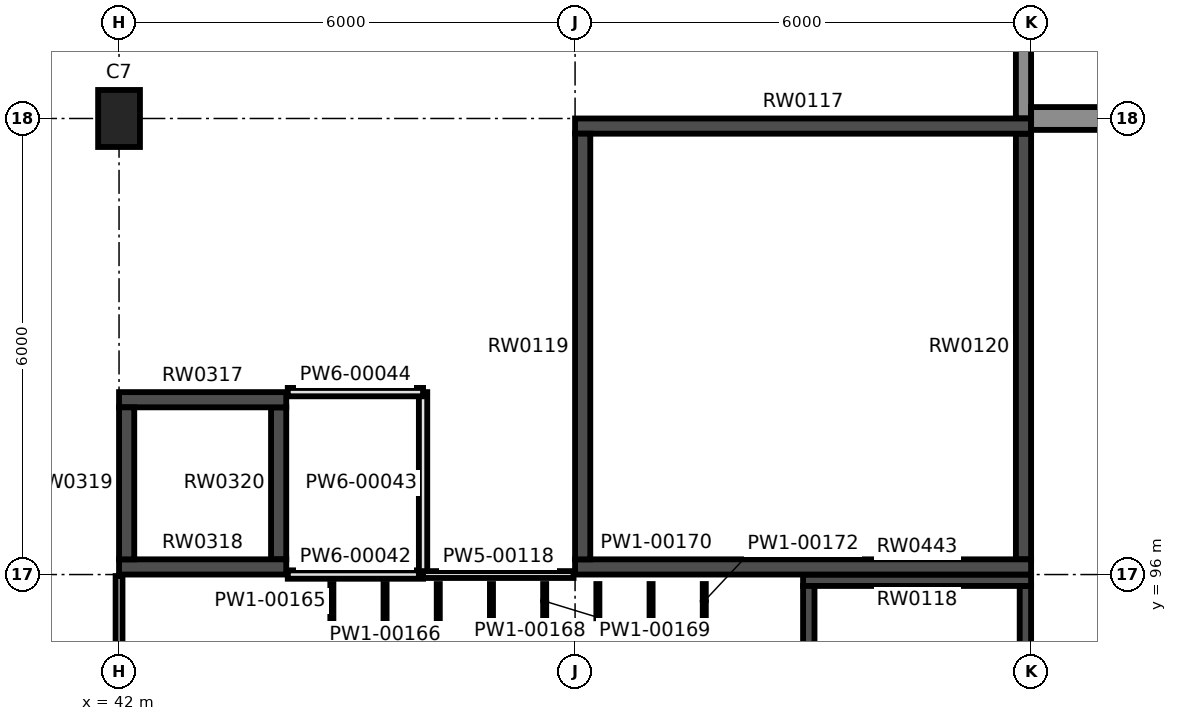
"""IFC4 building model, lengths in metres.
Left out: names, types, materials, properties, quantities, classifications, styles, units other than length and angle.
Written with IfcOpenShell. Run it as: python <this file> out.ifc"""

import sys

from ifc_helpers import new_model, si_unit, direction, frame, frame_2d, origin, origin_2d, place, context, subcontext, project, spatial, polyline, rectangle, outline, extrude, element, fill, save


model = new_model("IFC4")
c1 = context("Model", 3, precision=1e-05, world=origin(), true_north=direction((0.0, 1.0)))
c2 = subcontext(c1, "Body", "Model", "MODEL_VIEW")
j1 = project(units=[si_unit("LENGTHUNIT", "METRE"), si_unit("PLANEANGLEUNIT", "RADIAN")], contexts=[c1])
p1 = place(None, origin())
s1 = spatial("IfcSite", under=j1, at=p1, CompositionType="ELEMENT")
p2 = place(p1, origin())
s2 = spatial("IfcBuilding", under=s1, at=p2, CompositionType="ELEMENT")
p3 = place(p2, origin())
s3 = spatial("IfcBuildingStorey", under=s2, at=p3, CompositionType="ELEMENT", Elevation=0.0)
p4 = place(p3, frame((42.0, 102.0, -0.3), z_axis=(0.0, 0.0, 1.0), x_axis=(1.0, 0.0, 0.0)))
e1 = element("IfcColumn", 1, at=p4, inside=s3, PredefinedType="COLUMN", context=c2, shape_type="SweptSolid", body=[
    extrude(rectangle(XDim=0.55, YDim=0.75, at=origin_2d()), origin(), (0.0, 0.0, 1.0), 7.3),
])
p5 = place(p3, frame((48.0, 101.9, -0.3), z_axis=(0.0, 0.0, 1.0), x_axis=(1.0, 0.0, 0.0)))
e2 = element("IfcWall", 2, at=p5, inside=s3, PredefinedType="SHEAR", context=c2, shape_type="SweptSolid", body=[
    extrude(rectangle(XDim=6.0, YDim=0.2, at=frame_2d((3.0, 0.0))), origin(), (0.0, 0.0, 1.0), 7.3),
])
p6 = place(p5, frame((2.1, 0.0, 0.3)))
e3 = element("IfcOpeningElement", 3, at=p6, cuts=e2, PredefinedType="OPENING", context=c2, shape_type="SweptSolid", body=[
    extrude(rectangle(XDim=1.8, YDim=2.2, at=frame_2d((0.9, 1.1))), frame((0.0, 0.11, 0.0), z_axis=(0.0, -1.0, 0.0), x_axis=(1.0, 0.0, 0.0)), (0.0, 0.0, 1.0), 0.22),
])
p7 = place(p3, frame((48.0, 96.1, -0.3), z_axis=(0.0, 0.0, 1.0), x_axis=(1.0, 0.0, 0.0)))
e4 = element("IfcWall", 4, at=p7, inside=s3, PredefinedType="SHEAR", context=c2, shape_type="SweptSolid", body=[
    extrude(rectangle(XDim=6.0, YDim=0.2, at=frame_2d((3.0, 0.0))), origin(), (0.0, 0.0, 1.0), 7.3),
])
p8 = place(p3, frame((48.1, 96.2, -0.3), z_axis=(0.0, 0.0, 1.0), x_axis=(0.0, 1.0, 0.0)))
e5 = element("IfcWall", 5, at=p8, inside=s3, PredefinedType="SHEAR", context=c2, shape_type="SweptSolid", body=[
    extrude(rectangle(XDim=5.6, YDim=0.2, at=frame_2d((2.8, 0.0))), origin(), (0.0, 0.0, 1.0), 7.3),
])
p9 = place(p8, frame((4.4, 0.0, 0.3)))
e6 = element("IfcOpeningElement", 6, at=p9, cuts=e5, PredefinedType="OPENING", context=c2, shape_type="SweptSolid", body=[
    extrude(rectangle(XDim=1.1, YDim=2.2, at=frame_2d((0.55, 1.1))), frame((0.0, 0.11, 0.0), z_axis=(0.0, -1.0, 0.0), x_axis=(1.0, 0.0, 0.0)), (0.0, 0.0, 1.0), 0.22),
])
p10 = place(p3, frame((53.9, 96.2, -0.3), z_axis=(0.0, 0.0, 1.0), x_axis=(0.0, 1.0, 0.0)))
e7 = element("IfcWall", 7, at=p10, inside=s3, PredefinedType="SHEAR", context=c2, shape_type="SweptSolid", body=[
    extrude(rectangle(XDim=5.6, YDim=0.2, at=frame_2d((2.8, 0.0))), origin(), (0.0, 0.0, 1.0), 7.3),
])
p11 = place(p10, frame((4.4, 0.0, 0.3)))
e8 = element("IfcOpeningElement", 8, at=p11, cuts=e7, PredefinedType="OPENING", context=c2, shape_type="SweptSolid", body=[
    extrude(rectangle(XDim=1.1, YDim=2.4, at=frame_2d((0.55, 1.2))), frame((0.0, 0.11, 0.0), z_axis=(0.0, -1.0, 0.0), x_axis=(1.0, 0.0, 0.0)), (0.0, 0.0, 1.0), 0.22),
])
p12 = place(p3, frame((42.0, 98.3, -1.4), z_axis=(0.0, 0.0, 1.0), x_axis=(1.0, 0.0, 0.0)))
e9 = element("IfcWall", 9, at=p12, inside=s3, PredefinedType="SHEAR", context=c2, shape_type="SweptSolid", body=[
    extrude(rectangle(XDim=2.2, YDim=0.2, at=frame_2d((1.1, 0.0))), origin(), (0.0, 0.0, 1.0), 8.4),
])
p13 = place(p12, frame((0.55, 0.0, 1.4)))
e10 = element("IfcOpeningElement", 10, at=p13, cuts=e9, PredefinedType="OPENING", context=c2, shape_type="SweptSolid", body=[
    extrude(rectangle(XDim=1.1, YDim=2.1, at=frame_2d((0.55, 1.05))), frame((0.0, 0.11, 0.0), z_axis=(0.0, -1.0, 0.0), x_axis=(1.0, 0.0, 0.0)), (0.0, 0.0, 1.0), 0.22),
])
p14 = place(p3, frame((42.0, 96.1, -1.4), z_axis=(0.0, 0.0, 1.0), x_axis=(1.0, 0.0, 0.0)))
e11 = element("IfcWall", 11, at=p14, inside=s3, PredefinedType="SHEAR", context=c2, shape_type="SweptSolid", body=[
    extrude(rectangle(XDim=2.2, YDim=0.2, at=frame_2d((1.1, 0.0))), origin(), (0.0, 0.0, 1.0), 8.4),
])
for number, where, z_axis, x_axis in (
    (12, (42.1, 96.2, -1.4), (0.0, 0.0, 1.0), (0.0, 1.0, 0.0)),
    (13, (44.1, 96.2, -1.4), (0.0, 0.0, 1.0), (0.0, 1.0, 0.0)),
):
    element("IfcWall", number, at=place(p3, frame(where, z_axis=z_axis, x_axis=x_axis)), inside=s3, PredefinedType="SHEAR", context=c2, shape_type="SweptSolid", body=[
        extrude(rectangle(XDim=2.0, YDim=0.2, at=frame_2d((1.0, 0.0))), origin(), (0.0, 0.0, 1.0), 8.4),
    ])
p15 = place(p3, frame((51.0, 95.925, -0.3), z_axis=(0.0, 0.0, 1.0), x_axis=(1.0, 0.0, 0.0)))
e14 = element("IfcWall", 14, at=p15, inside=s3, PredefinedType="SHEAR", context=c2, shape_type="SweptSolid", body=[
    extrude(rectangle(XDim=3.0, YDim=0.15, at=frame_2d((1.5, 0.0))), origin(), (0.0, 0.0, 1.0), 7.3),
])
for number, where, z_axis, x_axis in (
    (15, (51.075, 90.15, -0.3), (0.0, 0.0, 1.0), (0.0, 1.0, 0.0)),
    (16, (53.925, 90.15, -0.3), (0.0, 0.0, 1.0), (0.0, 1.0, 0.0)),
):
    element("IfcWall", number, at=place(p3, frame(where, z_axis=z_axis, x_axis=x_axis)), inside=s3, PredefinedType="SHEAR", context=c2, shape_type="SweptSolid", body=[
        extrude(rectangle(XDim=5.7, YDim=0.15, at=frame_2d((2.85, 0.0))), origin(), (0.0, 0.0, 1.0), 7.3),
    ])
p16 = place(p3, frame((53.9, 107.775, 0.0), z_axis=(0.0, 0.0, 1.0), x_axis=(0.0, -1.0, 0.0)))
e17 = element("IfcWall", 17, at=p16, inside=s3, PredefinedType="SOLIDWALL", context=c2, shape_type="SweptSolid", body=[
    extrude(rectangle(XDim=5.775, YDim=0.2, at=frame_2d((2.887, 0.0))), origin(), (0.0, 0.0, 1.0), 6.15),
])
p17 = place(p16, frame((1.905, 0.0, 0.0)))
e18 = element("IfcOpeningElement", 18, at=p17, cuts=e17, PredefinedType="OPENING", context=c2, shape_type="SweptSolid", body=[
    extrude(rectangle(XDim=1.8, YDim=2.4, at=frame_2d((0.9, 1.2))), frame((0.0, 0.11, 0.0), z_axis=(0.0, -1.0, 0.0), x_axis=(1.0, 0.0, 0.0)), (0.0, 0.0, 1.0), 0.22),
])
p18 = place(p16, frame((1.905, 0.0, 2.5)))
e19 = element("IfcOpeningElement", 19, at=p18, cuts=e17, PredefinedType="OPENING", context=c2, shape_type="SweptSolid", body=[
    extrude(rectangle(XDim=1.8, YDim=3.3, at=frame_2d((0.9, 1.65))), frame((0.0, 0.11, 0.0), z_axis=(0.0, -1.0, 0.0), x_axis=(1.0, 0.0, 0.0)), (0.0, 0.0, 1.0), 0.22),
])
p19 = place(p16, frame((0.2, 0.0, 0.1)))
e20 = element("IfcOpeningElement", 20, at=p19, cuts=e17, PredefinedType="OPENING", context=c2, shape_type="SweptSolid", body=[
    extrude(rectangle(XDim=1.705, YDim=5.7, at=frame_2d((0.853, 2.85))), frame((0.0, 0.11, 0.0), z_axis=(0.0, -1.0, 0.0), x_axis=(1.0, 0.0, 0.0)), (0.0, 0.0, 1.0), 0.22),
])
p20 = place(p16, frame((3.705, 0.0, 0.1)))
e21 = element("IfcOpeningElement", 21, at=p20, cuts=e17, PredefinedType="OPENING", context=c2, shape_type="SweptSolid", body=[
    extrude(rectangle(XDim=1.87, YDim=5.7, at=frame_2d((0.935, 2.85))), frame((0.0, 0.11, 0.0), z_axis=(0.0, -1.0, 0.0), x_axis=(1.0, 0.0, 0.0)), (0.0, 0.0, 1.0), 0.22),
])
p21 = place(p3, frame((54.0, 102.0, 6.05), z_axis=(0.0, -1.0, 0.0), x_axis=(0.0, 0.0, -1.0)))
e22 = element("IfcWall", 22, at=p21, inside=s3, PredefinedType="SOLIDWALL", context=c2, shape_type="SweptSolid", body=[
    extrude(outline(polyline([(0.0, 0.0), (6.05, 0.0), (6.05, 0.25), (2.05, 0.25), (1.66, 0.288), (1.284, 0.4), (0.937, 0.582), (0.632, 0.827), (0.379, 1.127), (0.188, 1.469), (0.067, 1.842), (0.019, 2.231), (0.047, 2.622), (0.15, 3.0), (0.047, 3.378), (0.019, 3.769), (0.067, 4.158), (0.188, 4.531), (0.379, 4.873), (0.632, 5.173), (0.937, 5.418), (1.284, 5.6), (1.66, 5.712), (2.05, 5.75), (6.05, 5.75), (6.05, 6.0), (0.0, 6.0), (0.0, 0.0)])), origin(), (0.0, 0.0, -1.0), 0.3),
])
p22 = place(p3, frame((44.22, 96.0, 0.0), z_axis=(0.0, 0.0, 1.0), x_axis=(1.0, 0.0, 0.0)))
e23 = element("IfcWall", 23, at=p22, inside=s3, PredefinedType="PARTITIONING", context=c2, shape_type="SweptSolid", body=[
    extrude(rectangle(XDim=1.78, YDim=0.11, at=frame_2d((0.89, 0.0))), origin(), (0.0, 0.0, 1.0), 6.15),
])
p23 = place(p3, frame((46.0, 96.0, 0.0), z_axis=(0.0, 0.0, 1.0), x_axis=(0.0, 1.0, 0.0)))
e24 = element("IfcWall", 24, at=p23, inside=s3, PredefinedType="PARTITIONING", context=c2, shape_type="SweptSolid", body=[
    extrude(rectangle(XDim=2.4, YDim=0.11, at=frame_2d((1.2, 0.0))), origin(), (0.0, 0.0, 1.0), 6.15),
])
p24 = place(p23, frame((0.85, 0.0, 0.0)))
e25 = element("IfcOpeningElement", 25, at=p24, cuts=e24, PredefinedType="OPENING", context=c2, shape_type="SweptSolid", body=[
    extrude(rectangle(XDim=0.75, YDim=2.04, at=frame_2d((0.375, 1.02))), frame((0.0, 0.065, 0.0), z_axis=(0.0, -1.0, 0.0), x_axis=(1.0, 0.0, 0.0)), (0.0, 0.0, 1.0), 0.13),
])
p25 = place(p3, frame((44.22, 98.4, 0.0), z_axis=(0.0, 0.0, 1.0), x_axis=(1.0, 0.0, 0.0)))
e26 = element("IfcWall", 26, at=p25, inside=s3, PredefinedType="PARTITIONING", context=c2, shape_type="SweptSolid", body=[
    extrude(rectangle(XDim=1.78, YDim=0.11, at=frame_2d((0.89, 0.0))), origin(), (0.0, 0.0, 1.0), 6.75),
])
p26 = place(p3, frame((42.0, 90.02, 0.0), z_axis=(0.0, 0.0, 1.0), x_axis=(0.0, 1.0, 0.0)))
e27 = element("IfcWall", 27, at=p26, inside=s3, PredefinedType="PARTITIONING", context=c2, shape_type="SweptSolid", body=[
    extrude(rectangle(XDim=5.96, YDim=0.09, at=frame_2d((2.98, 0.0))), origin(), (0.0, 0.0, 1.0), 2.75),
])
p27 = place(p26, frame((2.53, 0.0, 0.0)))
e28 = element("IfcOpeningElement", 28, at=p27, cuts=e27, PredefinedType="OPENING", context=c2, shape_type="SweptSolid", body=[
    extrude(rectangle(XDim=0.92, YDim=2.04, at=frame_2d((0.46, 1.02))), frame((0.0, 0.055, 0.0), z_axis=(0.0, -1.0, 0.0), x_axis=(1.0, 0.0, 0.0)), (0.0, 0.0, 1.0), 0.11),
])
p28 = place(p3, frame((46.0, 96.0, 0.0), z_axis=(0.0, 0.0, 1.0), x_axis=(1.0, 0.0, 0.0)))
e29 = element("IfcWall", 29, at=p28, inside=s3, PredefinedType="PARTITIONING", context=c2, shape_type="SweptSolid", body=[
    extrude(rectangle(XDim=1.98, YDim=0.09, at=frame_2d((0.99, 0.0))), origin(), (0.0, 0.0, 1.0), 6.15),
])
for number, where, z_axis, x_axis in (
    (30, (44.8, 95.425, 0.0), (0.0, 0.0, 1.0), (0.0, 1.0, 0.0)),
    (31, (45.5, 95.425, 0.0), (0.0, 0.0, 1.0), (0.0, 1.0, 0.0)),
    (32, (46.2, 95.425, 0.0), (0.0, 0.0, 1.0), (0.0, 1.0, 0.0)),
    (33, (46.9, 95.425, 0.0), (0.0, 0.0, 1.0), (0.0, 1.0, 0.0)),
    (34, (47.6, 95.425, 0.0), (0.0, 0.0, 1.0), (0.0, 1.0, 0.0)),
    (35, (48.3, 95.425, 0.0), (0.0, 0.0, 1.0), (0.0, 1.0, 0.0)),
    (36, (49.0, 95.425, 0.0), (0.0, 0.0, 1.0), (0.0, 1.0, 0.0)),
    (37, (49.7, 95.425, 0.0), (0.0, 0.0, 1.0), (0.0, 1.0, 0.0)),
):
    element("IfcWall", number, at=place(p3, frame(where, z_axis=z_axis, x_axis=x_axis)), inside=s3, PredefinedType="PARTITIONING", context=c2, shape_type="SweptSolid", body=[
        extrude(rectangle(XDim=0.45, YDim=0.04, at=frame_2d((0.225, 0.0))), origin(), (0.0, 0.0, 1.0), 1.8),
    ])
p29 = place(p20, origin())
e38 = element("IfcWindow", 38, at=p29, inside=s3, PartitioningType="SINGLE_PANEL", PredefinedType="WINDOW", context=c2, shape_type="SweptSolid", body=[
    extrude(rectangle(XDim=1.87, YDim=5.7, at=frame_2d((0.935, 2.85))), frame((0.0, 0.03, 0.0), z_axis=(0.0, -1.0, 0.0), x_axis=(1.0, 0.0, 0.0)), (0.0, 0.0, 1.0), 0.06),
])
fill(e21, e38)
p30 = place(p11, frame((1.1, 0.0, 0.0), z_axis=(0.0, 0.0, 1.0), x_axis=(-1.0, 0.0, 0.0)))
e39 = element("IfcDoor", 39, at=p30, inside=s3, OperationType="DOUBLE_DOOR_SINGLE_SWING", PredefinedType="DOOR", context=c2, shape_type="SweptSolid", body=[
    extrude(rectangle(XDim=1.1, YDim=2.4, at=frame_2d((0.55, 1.2))), frame((0.0, 0.025, 0.0), z_axis=(0.0, -1.0, 0.0), x_axis=(1.0, 0.0, 0.0)), (0.0, 0.0, 1.0), 0.05),
])
fill(e8, e39)
p31 = place(p6, frame((1.8, 0.0, 0.0), z_axis=(0.0, 0.0, 1.0), x_axis=(-1.0, 0.0, 0.0)))
e40 = element("IfcDoor", 40, at=p31, inside=s3, OperationType="DOUBLE_DOOR_SINGLE_SWING", PredefinedType="DOOR", context=c2, shape_type="SweptSolid", body=[
    extrude(rectangle(XDim=1.8, YDim=2.2, at=frame_2d((0.9, 1.1))), frame((0.0, 0.025, 0.0), z_axis=(0.0, -1.0, 0.0), x_axis=(1.0, 0.0, 0.0)), (0.0, 0.0, 1.0), 0.05),
])
fill(e3, e40)
p32 = place(p9, frame((1.1, 0.0, 0.0), z_axis=(0.0, 0.0, 1.0), x_axis=(-1.0, 0.0, 0.0)))
e41 = element("IfcDoor", 41, at=p32, inside=s3, OperationType="SINGLE_SWING_RIGHT", PredefinedType="DOOR", context=c2, shape_type="SweptSolid", body=[
    extrude(rectangle(XDim=1.1, YDim=2.2, at=frame_2d((0.55, 1.1))), frame((0.0, 0.025, 0.0), z_axis=(0.0, -1.0, 0.0), x_axis=(1.0, 0.0, 0.0)), (0.0, 0.0, 1.0), 0.05),
])
fill(e6, e41)
p33 = place(p24, origin())
e42 = element("IfcDoor", 42, at=p33, inside=s3, OperationType="SINGLE_SWING_RIGHT", PredefinedType="DOOR", context=c2, shape_type="SweptSolid", body=[
    extrude(rectangle(XDim=0.75, YDim=2.04, at=frame_2d((0.375, 1.02))), frame((0.0, 0.025, 0.0), z_axis=(0.0, -1.0, 0.0), x_axis=(1.0, 0.0, 0.0)), (0.0, 0.0, 1.0), 0.05),
])
fill(e25, e42)
p34 = place(p13, origin())
e43 = element("IfcDoor", 43, at=p34, inside=s3, OperationType="DOUBLE_DOOR_SLIDING", PredefinedType="DOOR", context=c2, shape_type="SweptSolid", body=[
    extrude(rectangle(XDim=1.1, YDim=2.1, at=frame_2d((0.55, 1.05))), frame((0.0, 0.025, 0.0), z_axis=(0.0, -1.0, 0.0), x_axis=(1.0, 0.0, 0.0)), (0.0, 0.0, 1.0), 0.05),
])
fill(e10, e43)
save(model, sys.argv[1])
